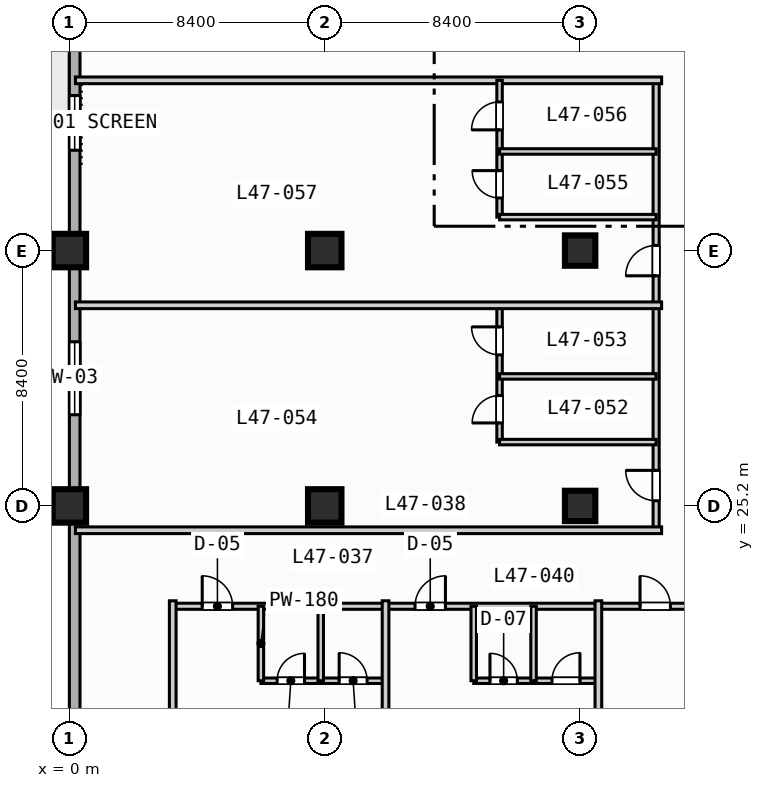
"""IFC4 building model, lengths in metres.
Left out: names, types, materials, properties, quantities, classifications, styles, units other than length and angle.
Written with IfcOpenShell. Run it as: python <this file> out.ifc"""

import sys

from ifc_helpers import new_model, si_unit, direction, frame, frame_2d, origin, origin_2d, place, context, subcontext, project, spatial, rectangle, extrude, element, fill, save


model = new_model("IFC4")
c1 = context("Model", 3, precision=1e-05, world=origin(), true_north=direction((0.0, 1.0)))
c2 = subcontext(c1, "Body", "Model", "MODEL_VIEW")
j1 = project(units=[si_unit("LENGTHUNIT", "METRE"), si_unit("PLANEANGLEUNIT", "RADIAN")], contexts=[c1])
p1 = place(None, origin())
s1 = spatial("IfcSite", under=j1, at=p1, CompositionType="ELEMENT")
p2 = place(p1, origin())
s2 = spatial("IfcBuilding", under=s1, at=p2, CompositionType="ELEMENT")
p3 = place(p2, frame((0.0, 0.0, 193.9)))
s3 = spatial("IfcBuildingStorey", under=s2, at=p3, CompositionType="ELEMENT", Elevation=193.9)
for number, where, z_axis, x_axis in (
    (1, (0.0, 25.2, 0.0), (0.0, 0.0, 1.0), (1.0, 0.0, 0.0)),
    (2, (0.0, 33.6, 0.0), (0.0, 0.0, 1.0), (1.0, 0.0, 0.0)),
    (3, (8.4, 25.2, 0.0), (0.0, 0.0, 1.0), (1.0, 0.0, 0.0)),
    (4, (8.4, 33.6, 0.0), (0.0, 0.0, 1.0), (1.0, 0.0, 0.0)),
):
    element("IfcColumn", number, at=place(p3, frame(where, z_axis=z_axis, x_axis=x_axis)), inside=s3, PredefinedType="COLUMN", context=c2, shape_type="SweptSolid", body=[
        extrude(rectangle(XDim=1.1, YDim=1.1, at=origin_2d()), origin(), (0.0, 0.0, 1.0), 3.7),
    ])
for number, where, z_axis, x_axis in (
    (5, (16.8, 25.2, 0.0), (0.0, 0.0, 1.0), (1.0, 0.0, 0.0)),
    (6, (16.8, 33.6, 0.0), (0.0, 0.0, 1.0), (1.0, 0.0, 0.0)),
):
    element("IfcColumn", number, at=place(p3, frame(where, z_axis=z_axis, x_axis=x_axis)), inside=s3, PredefinedType="COLUMN", context=c2, shape_type="SweptSolid", body=[
        extrude(rectangle(XDim=1.0, YDim=1.0, at=origin_2d()), origin(), (0.0, 0.0, 1.0), 3.7),
    ])
p4 = place(p3, frame((0.175, 3.175, 0.0), z_axis=(0.0, 0.0, 1.0), x_axis=(0.0, 1.0, 0.0)))
e7 = element("IfcWall", 7, at=p4, inside=s3, PredefinedType="STANDARD", context=c2, shape_type="SweptSolid", body=[
    extrude(rectangle(XDim=69.25, YDim=0.35, at=frame_2d((34.625, 0.0))), origin(), (0.0, 0.0, 1.0), 3.47),
])
p5 = place(p4, frame((42.325, 0.0, 0.0)))
e8 = element("IfcOpeningElement", 8, at=p5, cuts=e7, PredefinedType="OPENING", context=c2, shape_type="SweptSolid", body=[
    extrude(rectangle(XDim=1.4, YDim=2.2, at=frame_2d((0.7, 1.1))), frame((0.0, 0.185, 0.0), z_axis=(0.0, -1.0, 0.0), x_axis=(1.0, 0.0, 0.0)), (0.0, 0.0, 1.0), 0.37),
])
p6 = place(p4, frame((25.025, 0.0, 0.85)))
e9 = element("IfcOpeningElement", 9, at=p6, cuts=e7, PredefinedType="OPENING", context=c2, shape_type="SweptSolid", body=[
    extrude(rectangle(XDim=2.4, YDim=1.95, at=frame_2d((1.2, 0.975))), frame((0.0, 0.185, 0.0), z_axis=(0.0, -1.0, 0.0), x_axis=(1.0, 0.0, 0.0)), (0.0, 0.0, 1.0), 0.37),
])
p7 = place(p4, frame((33.725, 0.0, 0.85)))
e10 = element("IfcOpeningElement", 10, at=p7, cuts=e7, PredefinedType="OPENING", context=c2, shape_type="SweptSolid", body=[
    extrude(rectangle(XDim=1.8, YDim=1.8, at=frame_2d((0.9, 0.9))), frame((0.0, 0.185, 0.0), z_axis=(0.0, -1.0, 0.0), x_axis=(1.0, 0.0, 0.0)), (0.0, 0.0, 1.0), 0.37),
])
p8 = place(p4, frame((58.375, 0.0, 0.85)))
e11 = element("IfcOpeningElement", 11, at=p8, cuts=e7, PredefinedType="OPENING", context=c2, shape_type="SweptSolid", body=[
    extrude(rectangle(XDim=1.8, YDim=1.8, at=frame_2d((0.9, 0.9))), frame((0.0, 0.185, 0.0), z_axis=(0.0, -1.0, 0.0), x_axis=(1.0, 0.0, 0.0)), (0.0, 0.0, 1.0), 0.37),
])
p9 = place(p4, frame((64.775, 0.0, 0.85)))
e12 = element("IfcOpeningElement", 12, at=p9, cuts=e7, PredefinedType="OPENING", context=c2, shape_type="SweptSolid", body=[
    extrude(rectangle(XDim=1.8, YDim=1.8, at=frame_2d((0.9, 0.9))), frame((0.0, 0.185, 0.0), z_axis=(0.0, -1.0, 0.0), x_axis=(1.0, 0.0, 0.0)), (0.0, 0.0, 1.0), 0.37),
])
p10 = place(p3, frame((3.4, 21.9, 0.0), z_axis=(0.0, 0.0, 1.0), x_axis=(1.0, 0.0, 0.0)))
e13 = element("IfcWall", 13, at=p10, inside=s3, PredefinedType="PARTITIONING", context=c2, shape_type="SweptSolid", body=[
    extrude(rectangle(XDim=35.8, YDim=0.2, at=frame_2d((17.9, 0.0))), origin(), (0.0, 0.0, 1.0), 3.47),
])
p11 = place(p10, frame((0.97, 0.0, 0.0)))
e14 = element("IfcOpeningElement", 14, at=p11, cuts=e13, PredefinedType="OPENING", context=c2, shape_type="SweptSolid", body=[
    extrude(rectangle(XDim=1.0, YDim=2.15, at=frame_2d((0.5, 1.075))), frame((0.0, 0.11, 0.0), z_axis=(0.0, -1.0, 0.0), x_axis=(1.0, 0.0, 0.0)), (0.0, 0.0, 1.0), 0.22),
])
p12 = place(p10, frame((7.97, 0.0, 0.0)))
e15 = element("IfcOpeningElement", 15, at=p12, cuts=e13, PredefinedType="OPENING", context=c2, shape_type="SweptSolid", body=[
    extrude(rectangle(XDim=1.0, YDim=2.15, at=frame_2d((0.5, 1.075))), frame((0.0, 0.11, 0.0), z_axis=(0.0, -1.0, 0.0), x_axis=(1.0, 0.0, 0.0)), (0.0, 0.0, 1.0), 0.22),
])
p13 = place(p10, frame((15.37, 0.0, 0.0)))
e16 = element("IfcOpeningElement", 16, at=p13, cuts=e13, PredefinedType="OPENING", context=c2, shape_type="SweptSolid", body=[
    extrude(rectangle(XDim=1.0, YDim=2.15, at=frame_2d((0.5, 1.075))), frame((0.0, 0.11, 0.0), z_axis=(0.0, -1.0, 0.0), x_axis=(1.0, 0.0, 0.0)), (0.0, 0.0, 1.0), 0.22),
])
p14 = place(p10, frame((22.645, 0.0, 0.0)))
e17 = element("IfcOpeningElement", 17, at=p14, cuts=e13, PredefinedType="OPENING", context=c2, shape_type="SweptSolid", body=[
    extrude(rectangle(XDim=1.0, YDim=2.15, at=frame_2d((0.5, 1.075))), frame((0.0, 0.11, 0.0), z_axis=(0.0, -1.0, 0.0), x_axis=(1.0, 0.0, 0.0)), (0.0, 0.0, 1.0), 0.22),
])
p15 = place(p10, frame((28.97, 0.0, 0.0)))
e18 = element("IfcOpeningElement", 18, at=p15, cuts=e13, PredefinedType="OPENING", context=c2, shape_type="SweptSolid", body=[
    extrude(rectangle(XDim=1.0, YDim=2.15, at=frame_2d((0.5, 1.075))), frame((0.0, 0.11, 0.0), z_axis=(0.0, -1.0, 0.0), x_axis=(1.0, 0.0, 0.0)), (0.0, 0.0, 1.0), 0.22),
])
p16 = place(p3, frame((3.4, 0.2, 0.0), z_axis=(0.0, 0.0, 1.0), x_axis=(0.0, 1.0, 0.0)))
e19 = element("IfcWall", 19, at=p16, inside=s3, PredefinedType="PARTITIONING", context=c2, shape_type="SweptSolid", body=[
    extrude(rectangle(XDim=21.88, YDim=0.22, at=frame_2d((10.94, 0.0))), origin(), (0.0, 0.0, 1.0), 3.47),
])
p17 = place(p3, frame((6.3, 19.45, 0.0), z_axis=(0.0, 0.0, 1.0), x_axis=(1.0, 0.0, 0.0)))
e20 = element("IfcWall", 20, at=p17, inside=s3, PredefinedType="PLUMBINGWALL", context=c2, shape_type="SweptSolid", body=[
    extrude(rectangle(XDim=4.1, YDim=0.18, at=frame_2d((2.05, 0.0))), origin(), (0.0, 0.0, 1.0), 3.47),
])
p18 = place(p17, frame((0.534, 0.0, 0.0)))
e21 = element("IfcOpeningElement", 21, at=p18, cuts=e20, PredefinedType="OPENING", context=c2, shape_type="SweptSolid", body=[
    extrude(rectangle(XDim=0.9, YDim=2.1, at=frame_2d((0.45, 1.05))), frame((0.0, 0.1, 0.0), z_axis=(0.0, -1.0, 0.0), x_axis=(1.0, 0.0, 0.0)), (0.0, 0.0, 1.0), 0.2),
])
p19 = place(p17, frame((2.574, 0.0, 0.0)))
e22 = element("IfcOpeningElement", 22, at=p19, cuts=e20, PredefinedType="OPENING", context=c2, shape_type="SweptSolid", body=[
    extrude(rectangle(XDim=0.92, YDim=2.1, at=frame_2d((0.46, 1.05))), frame((0.0, 0.1, 0.0), z_axis=(0.0, -1.0, 0.0), x_axis=(1.0, 0.0, 0.0)), (0.0, 0.0, 1.0), 0.2),
])
p20 = place(p3, frame((6.3, 19.45, 0.0), z_axis=(0.0, 0.0, 1.0), x_axis=(0.0, 1.0, 0.0)))
e23 = element("IfcWall", 23, at=p20, inside=s3, PredefinedType="PLUMBINGWALL", context=c2, shape_type="SweptSolid", body=[
    extrude(rectangle(XDim=2.45, YDim=0.18, at=frame_2d((1.225, 0.0))), origin(), (0.0, 0.0, 1.0), 3.47),
])
p21 = place(p3, frame((8.268, 19.45, 0.0), z_axis=(0.0, 0.0, 1.0), x_axis=(0.0, 1.0, 0.0)))
e24 = element("IfcWall", 24, at=p21, inside=s3, PredefinedType="PLUMBINGWALL", context=c2, shape_type="SweptSolid", body=[
    extrude(rectangle(XDim=2.45, YDim=0.18, at=frame_2d((1.225, 0.0))), origin(), (0.0, 0.0, 1.0), 3.116),
])
p22 = place(p3, frame((10.4, 0.2, 0.0), z_axis=(0.0, 0.0, 1.0), x_axis=(0.0, 1.0, 0.0)))
e25 = element("IfcWall", 25, at=p22, inside=s3, PredefinedType="PARTITIONING", context=c2, shape_type="SweptSolid", body=[
    extrude(rectangle(XDim=21.88, YDim=0.22, at=frame_2d((10.94, 0.0))), origin(), (0.0, 0.0, 1.0), 3.47),
])
p23 = place(p3, frame((13.3, 19.45, 0.0), z_axis=(0.0, 0.0, 1.0), x_axis=(1.0, 0.0, 0.0)))
e26 = element("IfcWall", 26, at=p23, inside=s3, PredefinedType="PLUMBINGWALL", context=c2, shape_type="SweptSolid", body=[
    extrude(rectangle(XDim=4.1, YDim=0.18, at=frame_2d((2.05, 0.0))), origin(), (0.0, 0.0, 1.0), 3.47),
])
p24 = place(p23, frame((0.534, 0.0, 0.0)))
e27 = element("IfcOpeningElement", 27, at=p24, cuts=e26, PredefinedType="OPENING", context=c2, shape_type="SweptSolid", body=[
    extrude(rectangle(XDim=0.9, YDim=2.1, at=frame_2d((0.45, 1.05))), frame((0.0, 0.1, 0.0), z_axis=(0.0, -1.0, 0.0), x_axis=(1.0, 0.0, 0.0)), (0.0, 0.0, 1.0), 0.2),
])
p25 = place(p23, frame((2.574, 0.0, 0.0)))
e28 = element("IfcOpeningElement", 28, at=p25, cuts=e26, PredefinedType="OPENING", context=c2, shape_type="SweptSolid", body=[
    extrude(rectangle(XDim=0.92, YDim=2.1, at=frame_2d((0.46, 1.05))), frame((0.0, 0.1, 0.0), z_axis=(0.0, -1.0, 0.0), x_axis=(1.0, 0.0, 0.0)), (0.0, 0.0, 1.0), 0.2),
])
for number, where, z_axis, x_axis in (
    (29, (13.3, 19.45, 0.0), (0.0, 0.0, 1.0), (0.0, 1.0, 0.0)),
    (30, (15.268, 19.45, 0.0), (0.0, 0.0, 1.0), (0.0, 1.0, 0.0)),
):
    element("IfcWall", number, at=place(p3, frame(where, z_axis=z_axis, x_axis=x_axis)), inside=s3, PredefinedType="PLUMBINGWALL", context=c2, shape_type="SweptSolid", body=[
        extrude(rectangle(XDim=2.45, YDim=0.18, at=frame_2d((1.225, 0.0))), origin(), (0.0, 0.0, 1.0), 3.47),
    ])
p26 = place(p3, frame((17.4, 0.2, 0.0), z_axis=(0.0, 0.0, 1.0), x_axis=(0.0, 1.0, 0.0)))
e31 = element("IfcWall", 31, at=p26, inside=s3, PredefinedType="PARTITIONING", context=c2, shape_type="SweptSolid", body=[
    extrude(rectangle(XDim=21.88, YDim=0.22, at=frame_2d((10.94, 0.0))), origin(), (0.0, 0.0, 1.0), 3.47),
])
p27 = place(p3, frame((19.3, 24.4, 0.0), z_axis=(0.0, 0.0, 1.0), x_axis=(0.0, 1.0, 0.0)))
e32 = element("IfcWall", 32, at=p27, inside=s3, PredefinedType="PARTITIONING", context=c2, shape_type="SweptSolid", body=[
    extrude(rectangle(XDim=14.8, YDim=0.2, at=frame_2d((7.4, 0.0))), origin(), (0.0, 0.0, 1.0), 3.47),
])
p28 = place(p27, frame((0.97, 0.0, 0.0)))
e33 = element("IfcOpeningElement", 33, at=p28, cuts=e32, PredefinedType="OPENING", context=c2, shape_type="SweptSolid", body=[
    extrude(rectangle(XDim=1.0, YDim=2.15, at=frame_2d((0.5, 1.075))), frame((0.0, 0.11, 0.0), z_axis=(0.0, -1.0, 0.0), x_axis=(1.0, 0.0, 0.0)), (0.0, 0.0, 1.0), 0.22),
])
p29 = place(p27, frame((8.37, 0.0, 0.0)))
e34 = element("IfcOpeningElement", 34, at=p29, cuts=e32, PredefinedType="OPENING", context=c2, shape_type="SweptSolid", body=[
    extrude(rectangle(XDim=1.0, YDim=2.15, at=frame_2d((0.5, 1.075))), frame((0.0, 0.11, 0.0), z_axis=(0.0, -1.0, 0.0), x_axis=(1.0, 0.0, 0.0)), (0.0, 0.0, 1.0), 0.22),
])
p30 = place(p3, frame((0.2, 24.4, 0.0), z_axis=(0.0, 0.0, 1.0), x_axis=(1.0, 0.0, 0.0)))
e35 = element("IfcWall", 35, at=p30, inside=s3, PredefinedType="PARTITIONING", context=c2, shape_type="SweptSolid", body=[
    extrude(rectangle(XDim=19.28, YDim=0.22, at=frame_2d((9.64, 0.0))), origin(), (0.0, 0.0, 1.0), 3.47),
])
p31 = place(p3, frame((14.15, 27.3, 0.0), z_axis=(0.0, 0.0, 1.0), x_axis=(0.0, 1.0, 0.0)))
e36 = element("IfcWall", 36, at=p31, inside=s3, PredefinedType="PLUMBINGWALL", context=c2, shape_type="SweptSolid", body=[
    extrude(rectangle(XDim=4.5, YDim=0.18, at=frame_2d((2.25, 0.0))), origin(), (0.0, 0.0, 1.0), 3.47),
])
p32 = place(p31, frame((0.63, 0.0, 0.0)))
e37 = element("IfcOpeningElement", 37, at=p32, cuts=e36, PredefinedType="OPENING", context=c2, shape_type="SweptSolid", body=[
    extrude(rectangle(XDim=0.9, YDim=2.1, at=frame_2d((0.45, 1.05))), frame((0.0, 0.1, 0.0), z_axis=(0.0, -1.0, 0.0), x_axis=(1.0, 0.0, 0.0)), (0.0, 0.0, 1.0), 0.2),
])
p33 = place(p31, frame((2.87, 0.0, 0.0)))
e38 = element("IfcOpeningElement", 38, at=p33, cuts=e36, PredefinedType="OPENING", context=c2, shape_type="SweptSolid", body=[
    extrude(rectangle(XDim=0.92, YDim=2.1, at=frame_2d((0.46, 1.05))), frame((0.0, 0.1, 0.0), z_axis=(0.0, -1.0, 0.0), x_axis=(1.0, 0.0, 0.0)), (0.0, 0.0, 1.0), 0.2),
])
for number, where, z_axis, x_axis in (
    (39, (14.15, 27.3, 0.0), (0.0, 0.0, 1.0), (1.0, 0.0, 0.0)),
    (40, (14.15, 29.46, 0.0), (0.0, 0.0, 1.0), (1.0, 0.0, 0.0)),
):
    element("IfcWall", number, at=place(p3, frame(where, z_axis=z_axis, x_axis=x_axis)), inside=s3, PredefinedType="PLUMBINGWALL", context=c2, shape_type="SweptSolid", body=[
        extrude(rectangle(XDim=5.15, YDim=0.18, at=frame_2d((2.575, 0.0))), origin(), (0.0, 0.0, 1.0), 3.47),
    ])
for number, where, z_axis, x_axis in (
    (41, (0.2, 31.8, 0.0), (0.0, 0.0, 1.0), (1.0, 0.0, 0.0)),
    (42, (0.2, 39.2, 0.0), (0.0, 0.0, 1.0), (1.0, 0.0, 0.0)),
):
    element("IfcWall", number, at=place(p3, frame(where, z_axis=z_axis, x_axis=x_axis)), inside=s3, PredefinedType="PARTITIONING", context=c2, shape_type="SweptSolid", body=[
        extrude(rectangle(XDim=19.28, YDim=0.22, at=frame_2d((9.64, 0.0))), origin(), (0.0, 0.0, 1.0), 3.47),
    ])
p34 = place(p3, frame((14.15, 34.7, 0.0), z_axis=(0.0, 0.0, 1.0), x_axis=(0.0, 1.0, 0.0)))
e43 = element("IfcWall", 43, at=p34, inside=s3, PredefinedType="PLUMBINGWALL", context=c2, shape_type="SweptSolid", body=[
    extrude(rectangle(XDim=4.5, YDim=0.18, at=frame_2d((2.25, 0.0))), origin(), (0.0, 0.0, 1.0), 3.47),
])
p35 = place(p34, frame((0.63, 0.0, 0.0)))
e44 = element("IfcOpeningElement", 44, at=p35, cuts=e43, PredefinedType="OPENING", context=c2, shape_type="SweptSolid", body=[
    extrude(rectangle(XDim=0.9, YDim=2.1, at=frame_2d((0.45, 1.05))), frame((0.0, 0.1, 0.0), z_axis=(0.0, -1.0, 0.0), x_axis=(1.0, 0.0, 0.0)), (0.0, 0.0, 1.0), 0.2),
])
p36 = place(p34, frame((2.87, 0.0, 0.0)))
e45 = element("IfcOpeningElement", 45, at=p36, cuts=e43, PredefinedType="OPENING", context=c2, shape_type="SweptSolid", body=[
    extrude(rectangle(XDim=0.92, YDim=2.1, at=frame_2d((0.46, 1.05))), frame((0.0, 0.1, 0.0), z_axis=(0.0, -1.0, 0.0), x_axis=(1.0, 0.0, 0.0)), (0.0, 0.0, 1.0), 0.2),
])
for number, where, z_axis, x_axis in (
    (46, (14.15, 34.7, 0.0), (0.0, 0.0, 1.0), (1.0, 0.0, 0.0)),
    (47, (14.15, 36.86, 0.0), (0.0, 0.0, 1.0), (1.0, 0.0, 0.0)),
):
    element("IfcWall", number, at=place(p3, frame(where, z_axis=z_axis, x_axis=x_axis)), inside=s3, PredefinedType="PLUMBINGWALL", context=c2, shape_type="SweptSolid", body=[
        extrude(rectangle(XDim=5.15, YDim=0.18, at=frame_2d((2.575, 0.0))), origin(), (0.0, 0.0, 1.0), 3.47),
    ])
p37 = place(p6, origin())
e48 = element("IfcWindow", 48, at=p37, inside=s3, PartitioningType="SINGLE_PANEL", PredefinedType="WINDOW", context=c2, shape_type="SweptSolid", body=[
    extrude(rectangle(XDim=2.4, YDim=1.95, at=frame_2d((1.2, 0.975))), frame((0.0, 0.03, 0.0), z_axis=(0.0, -1.0, 0.0), x_axis=(1.0, 0.0, 0.0)), (0.0, 0.0, 1.0), 0.06),
])
fill(e9, e48)
p38 = place(p7, origin())
e49 = element("IfcWindow", 49, at=p38, inside=s3, PartitioningType="SINGLE_PANEL", PredefinedType="WINDOW", context=c2, shape_type="SweptSolid", body=[
    extrude(rectangle(XDim=1.8, YDim=1.8, at=frame_2d((0.9, 0.9))), frame((0.0, 0.03, 0.0), z_axis=(0.0, -1.0, 0.0), x_axis=(1.0, 0.0, 0.0)), (0.0, 0.0, 1.0), 0.06),
])
fill(e10, e49)
p39 = place(p11, origin())
e50 = element("IfcDoor", 50, at=p39, inside=s3, OperationType="SINGLE_SWING_LEFT", PredefinedType="DOOR", context=c2, shape_type="SweptSolid", body=[
    extrude(rectangle(XDim=1.0, YDim=2.15, at=frame_2d((0.5, 1.075))), frame((0.0, 0.025, 0.0), z_axis=(0.0, -1.0, 0.0), x_axis=(1.0, 0.0, 0.0)), (0.0, 0.0, 1.0), 0.05),
])
fill(e14, e50)
p40 = place(p12, origin())
e51 = element("IfcDoor", 51, at=p40, inside=s3, OperationType="SINGLE_SWING_RIGHT", PredefinedType="DOOR", context=c2, shape_type="SweptSolid", body=[
    extrude(rectangle(XDim=1.0, YDim=2.15, at=frame_2d((0.5, 1.075))), frame((0.0, 0.025, 0.0), z_axis=(0.0, -1.0, 0.0), x_axis=(1.0, 0.0, 0.0)), (0.0, 0.0, 1.0), 0.05),
])
fill(e15, e51)
p41 = place(p13, origin())
e52 = element("IfcDoor", 52, at=p41, inside=s3, OperationType="SINGLE_SWING_LEFT", PredefinedType="DOOR", context=c2, shape_type="SweptSolid", body=[
    extrude(rectangle(XDim=1.0, YDim=2.15, at=frame_2d((0.5, 1.075))), frame((0.0, 0.025, 0.0), z_axis=(0.0, -1.0, 0.0), x_axis=(1.0, 0.0, 0.0)), (0.0, 0.0, 1.0), 0.05),
])
fill(e16, e52)
p42 = place(p18, origin())
e53 = element("IfcDoor", 53, at=p42, inside=s3, OperationType="SINGLE_SWING_RIGHT", PredefinedType="DOOR", context=c2, shape_type="SweptSolid", body=[
    extrude(rectangle(XDim=0.9, YDim=2.1, at=frame_2d((0.45, 1.05))), frame((0.0, 0.025, 0.0), z_axis=(0.0, -1.0, 0.0), x_axis=(1.0, 0.0, 0.0)), (0.0, 0.0, 1.0), 0.05),
])
fill(e21, e53)
p43 = place(p19, origin())
e54 = element("IfcDoor", 54, at=p43, inside=s3, OperationType="SINGLE_SWING_LEFT", PredefinedType="DOOR", context=c2, shape_type="SweptSolid", body=[
    extrude(rectangle(XDim=0.92, YDim=2.1, at=frame_2d((0.46, 1.05))), frame((0.0, 0.025, 0.0), z_axis=(0.0, -1.0, 0.0), x_axis=(1.0, 0.0, 0.0)), (0.0, 0.0, 1.0), 0.05),
])
fill(e22, e54)
p44 = place(p24, origin())
e55 = element("IfcDoor", 55, at=p44, inside=s3, OperationType="SINGLE_SWING_LEFT", PredefinedType="DOOR", context=c2, shape_type="SweptSolid", body=[
    extrude(rectangle(XDim=0.9, YDim=2.1, at=frame_2d((0.45, 1.05))), frame((0.0, 0.025, 0.0), z_axis=(0.0, -1.0, 0.0), x_axis=(1.0, 0.0, 0.0)), (0.0, 0.0, 1.0), 0.05),
])
fill(e27, e55)
p45 = place(p25, origin())
e56 = element("IfcDoor", 56, at=p45, inside=s3, OperationType="SINGLE_SWING_RIGHT", PredefinedType="DOOR", context=c2, shape_type="SweptSolid", body=[
    extrude(rectangle(XDim=0.92, YDim=2.1, at=frame_2d((0.46, 1.05))), frame((0.0, 0.025, 0.0), z_axis=(0.0, -1.0, 0.0), x_axis=(1.0, 0.0, 0.0)), (0.0, 0.0, 1.0), 0.05),
])
fill(e28, e56)
p46 = place(p28, origin())
e57 = element("IfcDoor", 57, at=p46, inside=s3, OperationType="SINGLE_SWING_RIGHT", PredefinedType="DOOR", context=c2, shape_type="SweptSolid", body=[
    extrude(rectangle(XDim=1.0, YDim=2.15, at=frame_2d((0.5, 1.075))), frame((0.0, 0.025, 0.0), z_axis=(0.0, -1.0, 0.0), x_axis=(1.0, 0.0, 0.0)), (0.0, 0.0, 1.0), 0.05),
])
fill(e33, e57)
p47 = place(p29, origin())
e58 = element("IfcDoor", 58, at=p47, inside=s3, OperationType="SINGLE_SWING_LEFT", PredefinedType="DOOR", context=c2, shape_type="SweptSolid", body=[
    extrude(rectangle(XDim=1.0, YDim=2.15, at=frame_2d((0.5, 1.075))), frame((0.0, 0.025, 0.0), z_axis=(0.0, -1.0, 0.0), x_axis=(1.0, 0.0, 0.0)), (0.0, 0.0, 1.0), 0.05),
])
fill(e34, e58)
p48 = place(p32, origin())
e59 = element("IfcDoor", 59, at=p48, inside=s3, OperationType="SINGLE_SWING_LEFT", PredefinedType="DOOR", context=c2, shape_type="SweptSolid", body=[
    extrude(rectangle(XDim=0.9, YDim=2.1, at=frame_2d((0.45, 1.05))), frame((0.0, 0.025, 0.0), z_axis=(0.0, -1.0, 0.0), x_axis=(1.0, 0.0, 0.0)), (0.0, 0.0, 1.0), 0.05),
])
fill(e37, e59)
p49 = place(p33, origin())
e60 = element("IfcDoor", 60, at=p49, inside=s3, OperationType="SINGLE_SWING_RIGHT", PredefinedType="DOOR", context=c2, shape_type="SweptSolid", body=[
    extrude(rectangle(XDim=0.92, YDim=2.1, at=frame_2d((0.46, 1.05))), frame((0.0, 0.025, 0.0), z_axis=(0.0, -1.0, 0.0), x_axis=(1.0, 0.0, 0.0)), (0.0, 0.0, 1.0), 0.05),
])
fill(e38, e60)
p50 = place(p35, origin())
e61 = element("IfcDoor", 61, at=p50, inside=s3, OperationType="SINGLE_SWING_RIGHT", PredefinedType="DOOR", context=c2, shape_type="SweptSolid", body=[
    extrude(rectangle(XDim=0.9, YDim=2.1, at=frame_2d((0.45, 1.05))), frame((0.0, 0.025, 0.0), z_axis=(0.0, -1.0, 0.0), x_axis=(1.0, 0.0, 0.0)), (0.0, 0.0, 1.0), 0.05),
])
fill(e44, e61)
p51 = place(p36, origin())
e62 = element("IfcDoor", 62, at=p51, inside=s3, OperationType="SINGLE_SWING_LEFT", PredefinedType="DOOR", context=c2, shape_type="SweptSolid", body=[
    extrude(rectangle(XDim=0.92, YDim=2.1, at=frame_2d((0.46, 1.05))), frame((0.0, 0.025, 0.0), z_axis=(0.0, -1.0, 0.0), x_axis=(1.0, 0.0, 0.0)), (0.0, 0.0, 1.0), 0.05),
])
fill(e45, e62)
save(model, sys.argv[1])
